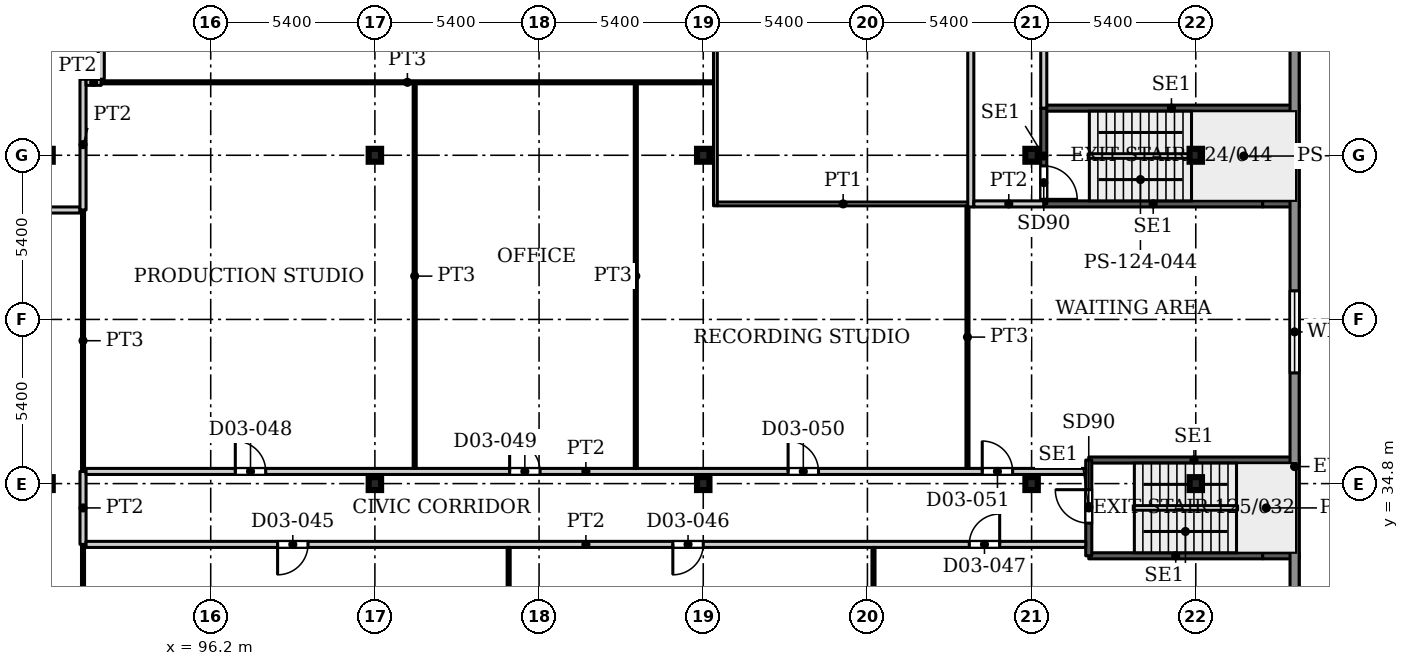
"""IFC4 building model, lengths in metres.
Left out: names, types, materials, properties, quantities, classifications, styles, units other than length and angle.
Written with IfcOpenShell. Run it as: python <this file> out.ifc"""

import sys

from ifc_helpers import new_model, si_unit, direction, frame, frame_2d, origin, origin_2d, place, context, subcontext, project, spatial, rectangle, i_section, extrude, source, transform, mapped, element, fill, save


model = new_model("IFC4")
c1 = context("Model", 3, precision=1e-05, world=origin(), true_north=direction((0.0, 1.0)))
c2 = subcontext(c1, "Body", "Model", "MODEL_VIEW")
j1 = project(units=[si_unit("LENGTHUNIT", "METRE"), si_unit("PLANEANGLEUNIT", "RADIAN")], contexts=[c1])
p1 = place(None, origin())
s1 = spatial("IfcSite", under=j1, at=p1, CompositionType="ELEMENT")
p2 = place(p1, origin())
s2 = spatial("IfcBuilding", under=s1, at=p2, CompositionType="ELEMENT")
p3 = place(p2, frame((0.0, 0.0, 17.0)))
s3 = spatial("IfcBuildingStorey", under=s2, at=p3, CompositionType="ELEMENT", Elevation=17.0)
for number, where, z_axis, x_axis in (
    (1, (90.8, 34.8, 0.0), (0.0, 0.0, 1.0), (1.0, 0.0, 0.0)),
    (2, (101.6, 34.8, 0.0), (0.0, 0.0, 1.0), (1.0, 0.0, 0.0)),
    (3, (112.4, 34.8, 0.0), (0.0, 0.0, 1.0), (1.0, 0.0, 0.0)),
    (4, (123.2, 34.8, 0.0), (0.0, 0.0, 1.0), (1.0, 0.0, 0.0)),
    (5, (128.6, 34.8, 0.0), (0.0, 0.0, 1.0), (1.0, 0.0, 0.0)),
    (6, (90.8, 45.6, 0.0), (0.0, 0.0, 1.0), (1.0, 0.0, 0.0)),
    (7, (101.6, 45.6, 0.0), (0.0, 0.0, 1.0), (1.0, 0.0, 0.0)),
    (8, (112.4, 45.6, 0.0), (0.0, 0.0, 1.0), (1.0, 0.0, 0.0)),
    (9, (123.2, 45.6, 0.0), (0.0, 0.0, 1.0), (1.0, 0.0, 0.0)),
    (10, (128.6, 45.6, 0.0), (0.0, 0.0, 1.0), (1.0, 0.0, 0.0)),
):
    element("IfcColumn", number, at=place(p3, frame(where, z_axis=z_axis, x_axis=x_axis)), inside=s3, PredefinedType="COLUMN", context=c2, shape_type="SweptSolid", body=[
        extrude(i_section(OverallWidth=0.409, OverallDepth=0.425, WebThickness=0.033, FlangeThickness=0.052, FilletRadius=0.013, at=origin_2d()), origin(), (0.0, 0.0, 1.0), 4.5),
    ])
p4 = place(p3, frame((131.85, 54.72, 0.0), z_axis=(0.0, 0.0, 1.0), x_axis=(0.0, -1.0, 0.0)))
e11 = element("IfcWall", 11, at=p4, inside=s3, PredefinedType="SOLIDWALL", context=c2, shape_type="SweptSolid", body=[
    extrude(rectangle(XDim=38.72, YDim=0.3, at=frame_2d((19.36, 0.0))), origin(), (0.0, 0.0, 1.0), 4.25),
])
p5 = place(p4, frame((2.435, 0.0, 0.9)))
e12 = element("IfcOpeningElement", 12, at=p5, cuts=e11, PredefinedType="OPENING", context=c2, shape_type="SweptSolid", body=[
    extrude(rectangle(XDim=2.7, YDim=2.1, at=frame_2d((1.35, 1.05))), frame((0.0, 0.16, 0.0), z_axis=(0.0, -1.0, 0.0), x_axis=(1.0, 0.0, 0.0)), (0.0, 0.0, 1.0), 0.32),
])
p6 = place(p4, frame((13.58, 0.0, 0.9)))
e13 = element("IfcOpeningElement", 13, at=p6, cuts=e11, PredefinedType="OPENING", context=c2, shape_type="SweptSolid", body=[
    extrude(rectangle(XDim=2.7, YDim=2.1, at=frame_2d((1.35, 1.05))), frame((0.0, 0.16, 0.0), z_axis=(0.0, -1.0, 0.0), x_axis=(1.0, 0.0, 0.0)), (0.0, 0.0, 1.0), 0.32),
])
p7 = place(p4, frame((26.16, 0.0, 0.9)))
e14 = element("IfcOpeningElement", 14, at=p7, cuts=e11, PredefinedType="OPENING", context=c2, shape_type="SweptSolid", body=[
    extrude(rectangle(XDim=2.7, YDim=2.1, at=frame_2d((1.35, 1.05))), frame((0.0, 0.16, 0.0), z_axis=(0.0, -1.0, 0.0), x_axis=(1.0, 0.0, 0.0)), (0.0, 0.0, 1.0), 0.32),
])
p8 = place(p3, frame((123.6, 44.0, 0.0), z_axis=(0.0, 0.0, 1.0), x_axis=(1.0, 0.0, 0.0)))
e15 = element("IfcWall", 15, at=p8, inside=s3, PredefinedType="SHEAR", context=c2, shape_type="SweptSolid", body=[
    extrude(rectangle(XDim=7.2, YDim=0.2, at=frame_2d((3.6, 0.0))), origin(), (0.0, 0.0, 1.0), 4.5),
])
p9 = place(p3, frame((130.8, 44.0, 0.0), z_axis=(0.0, 0.0, 1.0), x_axis=(1.0, 0.0, 0.0)))
e16 = element("IfcWall", 16, at=p9, inside=s3, PredefinedType="SHEAR", context=c2, shape_type="SweptSolid", body=[
    extrude(rectangle(XDim=1.2, YDim=0.2, at=frame_2d((0.6, 0.0))), origin(), (0.0, 0.0, 1.0), 4.5),
])
p10 = place(p3, frame((123.6, 47.15, 0.0), z_axis=(0.0, 0.0, 1.0), x_axis=(1.0, 0.0, 0.0)))
e17 = element("IfcWall", 17, at=p10, inside=s3, PredefinedType="SHEAR", context=c2, shape_type="SweptSolid", body=[
    extrude(rectangle(XDim=8.4, YDim=0.2, at=frame_2d((4.2, 0.0))), origin(), (0.0, 0.0, 1.0), 4.5),
])
p11 = place(p3, frame((123.6, 44.0, 0.0), z_axis=(0.0, 0.0, 1.0), x_axis=(0.0, 1.0, 0.0)))
e18 = element("IfcWall", 18, at=p11, inside=s3, PredefinedType="SHEAR", context=c2, shape_type="SweptSolid", body=[
    extrude(rectangle(XDim=3.15, YDim=0.2, at=frame_2d((1.575, 0.0))), origin(), (0.0, 0.0, 1.0), 4.5),
])
p12 = place(p11, frame((0.15, 0.0, 0.0)))
e19 = element("IfcOpeningElement", 19, at=p12, cuts=e18, PredefinedType="OPENING", context=c2, shape_type="SweptSolid", body=[
    extrude(rectangle(XDim=1.1, YDim=2.2, at=frame_2d((0.55, 1.1))), frame((0.0, 0.11, 0.0), z_axis=(0.0, -1.0, 0.0), x_axis=(1.0, 0.0, 0.0)), (0.0, 0.0, 1.0), 0.22),
])
p13 = place(p3, frame((125.08, 32.425, 0.0), z_axis=(0.0, 0.0, 1.0), x_axis=(1.0, 0.0, 0.0)))
e20 = element("IfcWall", 20, at=p13, inside=s3, PredefinedType="SHEAR", context=c2, shape_type="SweptSolid", body=[
    extrude(rectangle(XDim=5.72, YDim=0.2, at=frame_2d((2.86, 0.0))), origin(), (0.0, 0.0, 1.0), 4.5),
])
p14 = place(p3, frame((130.8, 32.425, 0.0), z_axis=(0.0, 0.0, 1.0), x_axis=(1.0, 0.0, 0.0)))
e21 = element("IfcWall", 21, at=p14, inside=s3, PredefinedType="SHEAR", context=c2, shape_type="SweptSolid", body=[
    extrude(rectangle(XDim=1.2, YDim=0.2, at=frame_2d((0.6, 0.0))), origin(), (0.0, 0.0, 1.0), 4.5),
])
p15 = place(p3, frame((125.08, 35.575, 0.0), z_axis=(0.0, 0.0, 1.0), x_axis=(1.0, 0.0, 0.0)))
e22 = element("IfcWall", 22, at=p15, inside=s3, PredefinedType="SHEAR", context=c2, shape_type="SweptSolid", body=[
    extrude(rectangle(XDim=6.92, YDim=0.2, at=frame_2d((3.46, 0.0))), origin(), (0.0, 0.0, 1.0), 4.5),
])
p16 = place(p3, frame((125.08, 32.425, 0.0), z_axis=(0.0, 0.0, 1.0), x_axis=(0.0, 1.0, 0.0)))
e23 = element("IfcWall", 23, at=p16, inside=s3, PredefinedType="SHEAR", context=c2, shape_type="SweptSolid", body=[
    extrude(rectangle(XDim=3.15, YDim=0.2, at=frame_2d((1.575, 0.0))), origin(), (0.0, 0.0, 1.0), 4.5),
])
p17 = place(p16, frame((1.075, 0.0, 0.0)))
e24 = element("IfcOpeningElement", 24, at=p17, cuts=e23, PredefinedType="OPENING", context=c2, shape_type="SweptSolid", body=[
    extrude(rectangle(XDim=1.1, YDim=2.2, at=frame_2d((0.55, 1.1))), frame((0.0, 0.11, 0.0), z_axis=(0.0, -1.0, 0.0), x_axis=(1.0, 0.0, 0.0)), (0.0, 0.0, 1.0), 0.22),
])
p18 = place(p3, frame((67.5, 43.8, 0.0), z_axis=(0.0, 0.0, 1.0), x_axis=(1.0, 0.0, 0.0)))
e25 = element("IfcWall", 25, at=p18, inside=s3, PredefinedType="PARTITIONING", context=c2, shape_type="SweptSolid", body=[
    extrude(rectangle(XDim=24.4, YDim=0.2, at=frame_2d((12.2, 0.0))), origin(), (0.0, 0.0, 1.0), 4.18),
])
p19 = place(p18, frame((11.3, 0.0, 0.0)))
e26 = element("IfcOpeningElement", 26, at=p19, cuts=e25, PredefinedType="OPENING", context=c2, shape_type="SweptSolid", body=[
    extrude(rectangle(XDim=1.8, YDim=2.1, at=frame_2d((0.9, 1.05))), frame((0.0, 0.11, 0.0), z_axis=(0.0, -1.0, 0.0), x_axis=(1.0, 0.0, 0.0)), (0.0, 0.0, 1.0), 0.22),
])
p20 = place(p3, frame((92.0, 22.05, 0.0), z_axis=(0.0, 0.0, 1.0), x_axis=(0.0, 1.0, 0.0)))
e27 = element("IfcWall", 27, at=p20, inside=s3, PredefinedType="PARTITIONING", context=c2, shape_type="SweptSolid", body=[
    extrude(rectangle(XDim=10.75, YDim=0.1, at=frame_2d((5.375, 0.0))), origin(), (0.0, 0.0, 1.0), 4.18),
])
p21 = place(p3, frame((92.0, 32.8, 0.0), z_axis=(0.0, 0.0, 1.0), x_axis=(0.0, 1.0, 0.0)))
e28 = element("IfcWall", 28, at=p21, inside=s3, PredefinedType="PARTITIONING", context=c2, shape_type="SweptSolid", body=[
    extrude(rectangle(XDim=2.4, YDim=0.2, at=frame_2d((1.2, 0.0))), origin(), (0.0, 0.0, 1.0), 4.18),
])
p22 = place(p3, frame((92.0, 35.2, 0.0), z_axis=(0.0, 0.0, 1.0), x_axis=(0.0, 1.0, 0.0)))
e29 = element("IfcWall", 29, at=p22, inside=s3, PredefinedType="PARTITIONING", context=c2, shape_type="SweptSolid", body=[
    extrude(rectangle(XDim=8.6, YDim=0.1, at=frame_2d((4.3, 0.0))), origin(), (0.0, 0.0, 1.0), 4.18),
])
p23 = place(p3, frame((92.0, 43.8, 0.0), z_axis=(0.0, 0.0, 1.0), x_axis=(0.0, 1.0, 0.0)))
e30 = element("IfcWall", 30, at=p23, inside=s3, PredefinedType="PARTITIONING", context=c2, shape_type="SweptSolid", body=[
    extrude(rectangle(XDim=4.3, YDim=0.2, at=frame_2d((2.15, 0.0))), origin(), (0.0, 0.0, 1.0), 4.18),
])
p24 = place(p3, frame((92.1, 32.8, 0.0), z_axis=(0.0, 0.0, 1.0), x_axis=(1.0, 0.0, 0.0)))
e31 = element("IfcWall", 31, at=p24, inside=s3, PredefinedType="PARTITIONING", context=c2, shape_type="SweptSolid", body=[
    extrude(rectangle(XDim=32.881, YDim=0.2, at=frame_2d((16.44, 0.0))), origin(), (0.0, 0.0, 1.0), 4.18),
])
p25 = place(p24, frame((6.3, 0.0, 0.0)))
e32 = element("IfcOpeningElement", 32, at=p25, cuts=e31, PredefinedType="OPENING", context=c2, shape_type="SweptSolid", body=[
    extrude(rectangle(XDim=1.0, YDim=2.1, at=frame_2d((0.5, 1.05))), frame((0.0, 0.11, 0.0), z_axis=(0.0, -1.0, 0.0), x_axis=(1.0, 0.0, 0.0)), (0.0, 0.0, 1.0), 0.22),
])
p26 = place(p24, frame((19.3, 0.0, 0.0)))
e33 = element("IfcOpeningElement", 33, at=p26, cuts=e31, PredefinedType="OPENING", context=c2, shape_type="SweptSolid", body=[
    extrude(rectangle(XDim=1.0, YDim=2.1, at=frame_2d((0.5, 1.05))), frame((0.0, 0.11, 0.0), z_axis=(0.0, -1.0, 0.0), x_axis=(1.0, 0.0, 0.0)), (0.0, 0.0, 1.0), 0.22),
])
p27 = place(p24, frame((29.05, 0.0, 0.0)))
e34 = element("IfcOpeningElement", 34, at=p27, cuts=e31, PredefinedType="OPENING", context=c2, shape_type="SweptSolid", body=[
    extrude(rectangle(XDim=1.0, YDim=2.1, at=frame_2d((0.5, 1.05))), frame((0.0, 0.11, 0.0), z_axis=(0.0, -1.0, 0.0), x_axis=(1.0, 0.0, 0.0)), (0.0, 0.0, 1.0), 0.22),
])
p28 = place(p3, frame((92.1, 35.2, 0.0), z_axis=(0.0, 0.0, 1.0), x_axis=(1.0, 0.0, 0.0)))
e35 = element("IfcWall", 35, at=p28, inside=s3, PredefinedType="PARTITIONING", context=c2, shape_type="SweptSolid", body=[
    extrude(rectangle(XDim=32.88, YDim=0.2, at=frame_2d((16.44, 0.0))), origin(), (0.0, 0.0, 1.0), 4.18),
])
p29 = place(p28, frame((4.909, 0.0, 0.0)))
e36 = element("IfcOpeningElement", 36, at=p29, cuts=e35, PredefinedType="OPENING", context=c2, shape_type="SweptSolid", body=[
    extrude(rectangle(XDim=1.0, YDim=2.1, at=frame_2d((0.5, 1.05))), frame((0.0, 0.11, 0.0), z_axis=(0.0, -1.0, 0.0), x_axis=(1.0, 0.0, 0.0)), (0.0, 0.0, 1.0), 0.22),
])
p30 = place(p28, frame((13.932, 0.0, 0.0)))
e37 = element("IfcOpeningElement", 37, at=p30, cuts=e35, PredefinedType="OPENING", context=c2, shape_type="SweptSolid", body=[
    extrude(rectangle(XDim=1.0, YDim=2.1, at=frame_2d((0.5, 1.05))), frame((0.0, 0.11, 0.0), z_axis=(0.0, -1.0, 0.0), x_axis=(1.0, 0.0, 0.0)), (0.0, 0.0, 1.0), 0.22),
])
p31 = place(p28, frame((23.091, 0.0, 0.0)))
e38 = element("IfcOpeningElement", 38, at=p31, cuts=e35, PredefinedType="OPENING", context=c2, shape_type="SweptSolid", body=[
    extrude(rectangle(XDim=1.0, YDim=2.1, at=frame_2d((0.5, 1.05))), frame((0.0, 0.11, 0.0), z_axis=(0.0, -1.0, 0.0), x_axis=(1.0, 0.0, 0.0)), (0.0, 0.0, 1.0), 0.22),
])
p32 = place(p28, frame((29.477, 0.0, 0.0)))
e39 = element("IfcOpeningElement", 39, at=p32, cuts=e35, PredefinedType="OPENING", context=c2, shape_type="SweptSolid", body=[
    extrude(rectangle(XDim=1.0, YDim=2.1, at=frame_2d((0.5, 1.05))), frame((0.0, 0.11, 0.0), z_axis=(0.0, -1.0, 0.0), x_axis=(1.0, 0.0, 0.0)), (0.0, 0.0, 1.0), 0.22),
])
p33 = place(p3, frame((92.1, 48.0, 0.0), z_axis=(0.0, 0.0, 1.0), x_axis=(1.0, 0.0, 0.0)))
e40 = element("IfcWall", 40, at=p33, inside=s3, PredefinedType="PARTITIONING", context=c2, shape_type="SweptSolid", body=[
    extrude(rectangle(XDim=0.5, YDim=0.2, at=frame_2d((0.25, 0.0))), origin(), (0.0, 0.0, 1.0), 4.18),
])
p34 = place(p3, frame((92.6, 48.0, 0.0), z_axis=(0.0, 0.0, 1.0), x_axis=(1.0, 0.0, 0.0)))
e41 = element("IfcWall", 41, at=p34, inside=s3, PredefinedType="PARTITIONING", context=c2, shape_type="SweptSolid", body=[
    extrude(rectangle(XDim=20.138, YDim=0.1, at=frame_2d((10.069, 0.0))), origin(), (0.0, 0.0, 1.0), 4.18),
])
p35 = place(p3, frame((92.6, 48.1, 0.0), z_axis=(0.0, 0.0, 1.0), x_axis=(0.0, 1.0, 0.0)))
e42 = element("IfcWall", 42, at=p35, inside=s3, PredefinedType="PARTITIONING", context=c2, shape_type="SweptSolid", body=[
    extrude(rectangle(XDim=20.9, YDim=0.2, at=frame_2d((10.45, 0.0))), origin(), (0.0, 0.0, 1.0), 4.18),
])
p36 = place(p35, frame((8.05, 0.0, 0.0)))
e43 = element("IfcOpeningElement", 43, at=p36, cuts=e42, PredefinedType="OPENING", context=c2, shape_type="SweptSolid", body=[
    extrude(rectangle(XDim=1.8, YDim=2.1, at=frame_2d((0.9, 1.05))), frame((0.0, 0.11, 0.0), z_axis=(0.0, -1.0, 0.0), x_axis=(1.0, 0.0, 0.0)), (0.0, 0.0, 1.0), 0.22),
])
p37 = place(p35, frame((18.8, 0.0, 0.0)))
e44 = element("IfcOpeningElement", 44, at=p37, cuts=e42, PredefinedType="OPENING", context=c2, shape_type="SweptSolid", body=[
    extrude(rectangle(XDim=1.0, YDim=2.1, at=frame_2d((0.5, 1.05))), frame((0.0, 0.11, 0.0), z_axis=(0.0, -1.0, 0.0), x_axis=(1.0, 0.0, 0.0)), (0.0, 0.0, 1.0), 0.22),
])
p38 = place(p3, frame((102.909, 35.3, 0.0), z_axis=(0.0, 0.0, 1.0), x_axis=(0.0, 1.0, 0.0)))
e45 = element("IfcWall", 45, at=p38, inside=s3, PredefinedType="PARTITIONING", context=c2, shape_type="SweptSolid", body=[
    extrude(rectangle(XDim=12.65, YDim=0.1, at=frame_2d((6.325, 0.0))), origin(), (0.0, 0.0, 1.0), 4.18),
])
p39 = place(p3, frame((106.0, 22.05, 0.0), z_axis=(0.0, 0.0, 1.0), x_axis=(0.0, 1.0, 0.0)))
e46 = element("IfcWall", 46, at=p39, inside=s3, PredefinedType="PARTITIONING", context=c2, shape_type="SweptSolid", body=[
    extrude(rectangle(XDim=10.65, YDim=0.1, at=frame_2d((5.325, 0.0))), origin(), (0.0, 0.0, 1.0), 4.18),
])
p40 = place(p3, frame((110.182, 35.3, 0.0), z_axis=(0.0, 0.0, 1.0), x_axis=(0.0, 1.0, 0.0)))
e47 = element("IfcWall", 47, at=p40, inside=s3, PredefinedType="PARTITIONING", context=c2, shape_type="SweptSolid", body=[
    extrude(rectangle(XDim=12.65, YDim=0.1, at=frame_2d((6.325, 0.0))), origin(), (0.0, 0.0, 1.0), 4.18),
])
p41 = place(p3, frame((112.8, 43.938, 0.0), z_axis=(0.0, 0.0, 1.0), x_axis=(0.0, 1.0, 0.0)))
e48 = element("IfcWall", 48, at=p41, inside=s3, PredefinedType="PARTITIONING", context=c2, shape_type="SweptSolid", body=[
    extrude(rectangle(XDim=46.787, YDim=0.125, at=frame_2d((23.394, 0.0))), origin(), (0.0, 0.0, 1.0), 4.18),
])
p42 = place(p3, frame((112.862, 44.0, 0.0), z_axis=(0.0, 0.0, 1.0), x_axis=(1.0, 0.0, 0.0)))
e49 = element("IfcWall", 49, at=p42, inside=s3, PredefinedType="PARTITIONING", context=c2, shape_type="SweptSolid", body=[
    extrude(rectangle(XDim=8.279, YDim=0.125, at=frame_2d((4.14, 0.0))), origin(), (0.0, 0.0, 1.0), 4.18),
])
p43 = place(p3, frame((118.0, 22.05, 0.0), z_axis=(0.0, 0.0, 1.0), x_axis=(0.0, 1.0, 0.0)))
e50 = element("IfcWall", 50, at=p43, inside=s3, PredefinedType="PARTITIONING", context=c2, shape_type="SweptSolid", body=[
    extrude(rectangle(XDim=10.65, YDim=0.1, at=frame_2d((5.325, 0.0))), origin(), (0.0, 0.0, 1.0), 4.18),
])
p44 = place(p3, frame((121.091, 35.3, 0.0), z_axis=(0.0, 0.0, 1.0), x_axis=(0.0, 1.0, 0.0)))
e51 = element("IfcWall", 51, at=p44, inside=s3, PredefinedType="PARTITIONING", context=c2, shape_type="SweptSolid", body=[
    extrude(rectangle(XDim=8.638, YDim=0.1, at=frame_2d((4.319, 0.0))), origin(), (0.0, 0.0, 1.0), 4.18),
])
p45 = place(p3, frame((121.2, 43.9, 0.0), z_axis=(0.0, 0.0, 1.0), x_axis=(0.0, 1.0, 0.0)))
e52 = element("IfcWall", 52, at=p45, inside=s3, PredefinedType="PARTITIONING", context=c2, shape_type="SweptSolid", body=[
    extrude(rectangle(XDim=22.6, YDim=0.2, at=frame_2d((11.3, 0.0))), origin(), (0.0, 0.0, 1.0), 4.18),
])
p46 = place(p45, frame((6.112, 0.0, 0.0)))
e53 = element("IfcOpeningElement", 53, at=p46, cuts=e52, PredefinedType="OPENING", context=c2, shape_type="SweptSolid", body=[
    extrude(rectangle(XDim=1.0, YDim=2.1, at=frame_2d((0.5, 1.05))), frame((0.0, 0.11, 0.0), z_axis=(0.0, -1.0, 0.0), x_axis=(1.0, 0.0, 0.0)), (0.0, 0.0, 1.0), 0.22),
])
p47 = place(p45, frame((17.45, 0.0, 0.0)))
e54 = element("IfcOpeningElement", 54, at=p47, cuts=e52, PredefinedType="OPENING", context=c2, shape_type="SweptSolid", body=[
    extrude(rectangle(XDim=1.0, YDim=2.1, at=frame_2d((0.5, 1.05))), frame((0.0, 0.11, 0.0), z_axis=(0.0, -1.0, 0.0), x_axis=(1.0, 0.0, 0.0)), (0.0, 0.0, 1.0), 0.22),
])
p48 = place(p3, frame((121.3, 44.0, 0.0), z_axis=(0.0, 0.0, 1.0), x_axis=(1.0, 0.0, 0.0)))
e55 = element("IfcWall", 55, at=p48, inside=s3, PredefinedType="PARTITIONING", context=c2, shape_type="SweptSolid", body=[
    extrude(rectangle(XDim=2.3, YDim=0.2, at=frame_2d((1.15, 0.0))), origin(), (0.0, 0.0, 1.0), 4.18),
])
p49 = place(p3, frame((123.6, 47.15, 0.0), z_axis=(0.0, 0.0, 1.0), x_axis=(0.0, 1.0, 0.0)))
e56 = element("IfcWall", 56, at=p49, inside=s3, PredefinedType="PARTITIONING", context=c2, shape_type="SweptSolid", body=[
    extrude(rectangle(XDim=18.85, YDim=0.2, at=frame_2d((9.425, 0.0))), origin(), (0.0, 0.0, 1.0), 4.18),
])
p50 = place(p49, frame((6.65, 0.0, 0.0)))
e57 = element("IfcOpeningElement", 57, at=p50, cuts=e56, PredefinedType="OPENING", context=c2, shape_type="SweptSolid", body=[
    extrude(rectangle(XDim=1.0, YDim=2.1, at=frame_2d((0.5, 1.05))), frame((0.0, 0.11, 0.0), z_axis=(0.0, -1.0, 0.0), x_axis=(1.0, 0.0, 0.0)), (0.0, 0.0, 1.0), 0.22),
])
p51 = place(p49, frame((16.119, 0.0, 0.0)))
e58 = element("IfcOpeningElement", 58, at=p51, cuts=e56, PredefinedType="OPENING", context=c2, shape_type="SweptSolid", body=[
    extrude(rectangle(XDim=1.0, YDim=2.1, at=frame_2d((0.5, 1.05))), frame((0.0, 0.11, 0.0), z_axis=(0.0, -1.0, 0.0), x_axis=(1.0, 0.0, 0.0)), (0.0, 0.0, 1.0), 0.22),
])
m1 = source(origin(), c2, "Body", "SweptSolid", [
    extrude(rectangle(XDim=2.7, YDim=2.1, at=frame_2d((1.35, 1.05))), frame((0.0, 0.03, 0.0), z_axis=(0.0, -1.0, 0.0), x_axis=(1.0, 0.0, 0.0)), (0.0, 0.0, 1.0), 0.06),
])
p52 = place(p6, origin())
e59 = element("IfcWindow", 59, at=p52, inside=s3, PartitioningType="SINGLE_PANEL", PredefinedType="WINDOW", context=c2, shape_type="MappedRepresentation", body=[
    mapped(m1, transform((0.0, 0.0, 0.0), x_axis=(1.0, 0.0, 0.0), y_axis=(0.0, 1.0, 0.0), z_axis=(0.0, 0.0, 1.0), scale=1.0)),
])
fill(e13, e59)
m2 = source(origin(), c2, "Body", "SweptSolid", [
    extrude(rectangle(XDim=1.1, YDim=2.2, at=frame_2d((0.55, 1.1))), frame((0.0, 0.025, 0.0), z_axis=(0.0, -1.0, 0.0), x_axis=(1.0, 0.0, 0.0)), (0.0, 0.0, 1.0), 0.05),
])
p53 = place(p12, origin())
e60 = element("IfcDoor", 60, at=p53, inside=s3, OperationType="SINGLE_SWING_RIGHT", PredefinedType="DOOR", context=c2, shape_type="MappedRepresentation", body=[
    mapped(m2, transform((0.0, 0.0, 0.0), x_axis=(1.0, 0.0, 0.0), y_axis=(0.0, 1.0, 0.0), z_axis=(0.0, 0.0, 1.0), scale=1.0)),
])
fill(e19, e60)
p54 = place(p17, origin())
e61 = element("IfcDoor", 61, at=p54, inside=s3, OperationType="SINGLE_SWING_LEFT", PredefinedType="DOOR", context=c2, shape_type="MappedRepresentation", body=[
    mapped(m2, transform((0.0, 0.0, 0.0), x_axis=(1.0, 0.0, 0.0), y_axis=(0.0, 1.0, 0.0), z_axis=(0.0, 0.0, 1.0), scale=1.0)),
])
fill(e24, e61)
m3 = source(origin(), c2, "Body", "SweptSolid", [
    extrude(rectangle(XDim=1.0, YDim=2.1, at=frame_2d((0.5, 1.05))), frame((0.0, 0.025, 0.0), z_axis=(0.0, -1.0, 0.0), x_axis=(1.0, 0.0, 0.0)), (0.0, 0.0, 1.0), 0.05),
])
p55 = place(p25, origin())
e62 = element("IfcDoor", 62, at=p55, inside=s3, OperationType="SINGLE_SWING_RIGHT", PredefinedType="DOOR", context=c2, shape_type="MappedRepresentation", body=[
    mapped(m3, transform((0.0, 0.0, 0.0), x_axis=(1.0, 0.0, 0.0), y_axis=(0.0, 1.0, 0.0), z_axis=(0.0, 0.0, 1.0), scale=1.0)),
])
fill(e32, e62)
p56 = place(p26, origin())
e63 = element("IfcDoor", 63, at=p56, inside=s3, OperationType="SINGLE_SWING_RIGHT", PredefinedType="DOOR", context=c2, shape_type="MappedRepresentation", body=[
    mapped(m3, transform((0.0, 0.0, 0.0), x_axis=(1.0, 0.0, 0.0), y_axis=(0.0, 1.0, 0.0), z_axis=(0.0, 0.0, 1.0), scale=1.0)),
])
fill(e33, e63)
p57 = place(p27, origin())
e64 = element("IfcDoor", 64, at=p57, inside=s3, OperationType="SINGLE_SWING_LEFT", PredefinedType="DOOR", context=c2, shape_type="MappedRepresentation", body=[
    mapped(m3, transform((0.0, 0.0, 0.0), x_axis=(1.0, 0.0, 0.0), y_axis=(0.0, 1.0, 0.0), z_axis=(0.0, 0.0, 1.0), scale=1.0)),
])
fill(e34, e64)
p58 = place(p29, origin())
e65 = element("IfcDoor", 65, at=p58, inside=s3, OperationType="SINGLE_SWING_LEFT", PredefinedType="DOOR", context=c2, shape_type="MappedRepresentation", body=[
    mapped(m3, transform((0.0, 0.0, 0.0), x_axis=(1.0, 0.0, 0.0), y_axis=(0.0, 1.0, 0.0), z_axis=(0.0, 0.0, 1.0), scale=1.0)),
])
fill(e36, e65)
p59 = place(p30, origin())
e66 = element("IfcDoor", 66, at=p59, inside=s3, OperationType="SINGLE_SWING_LEFT", PredefinedType="DOOR", context=c2, shape_type="MappedRepresentation", body=[
    mapped(m3, transform((0.0, 0.0, 0.0), x_axis=(1.0, 0.0, 0.0), y_axis=(0.0, 1.0, 0.0), z_axis=(0.0, 0.0, 1.0), scale=1.0)),
])
fill(e37, e66)
p60 = place(p31, origin())
e67 = element("IfcDoor", 67, at=p60, inside=s3, OperationType="SINGLE_SWING_LEFT", PredefinedType="DOOR", context=c2, shape_type="MappedRepresentation", body=[
    mapped(m3, transform((0.0, 0.0, 0.0), x_axis=(1.0, 0.0, 0.0), y_axis=(0.0, 1.0, 0.0), z_axis=(0.0, 0.0, 1.0), scale=1.0)),
])
fill(e38, e67)
p61 = place(p32, origin())
e68 = element("IfcDoor", 68, at=p61, inside=s3, OperationType="SINGLE_SWING_LEFT", PredefinedType="DOOR", context=c2, shape_type="MappedRepresentation", body=[
    mapped(m3, transform((0.0, 0.0, 0.0), x_axis=(1.0, 0.0, 0.0), y_axis=(0.0, 1.0, 0.0), z_axis=(0.0, 0.0, 1.0), scale=1.0)),
])
fill(e39, e68)
save(model, sys.argv[1])
